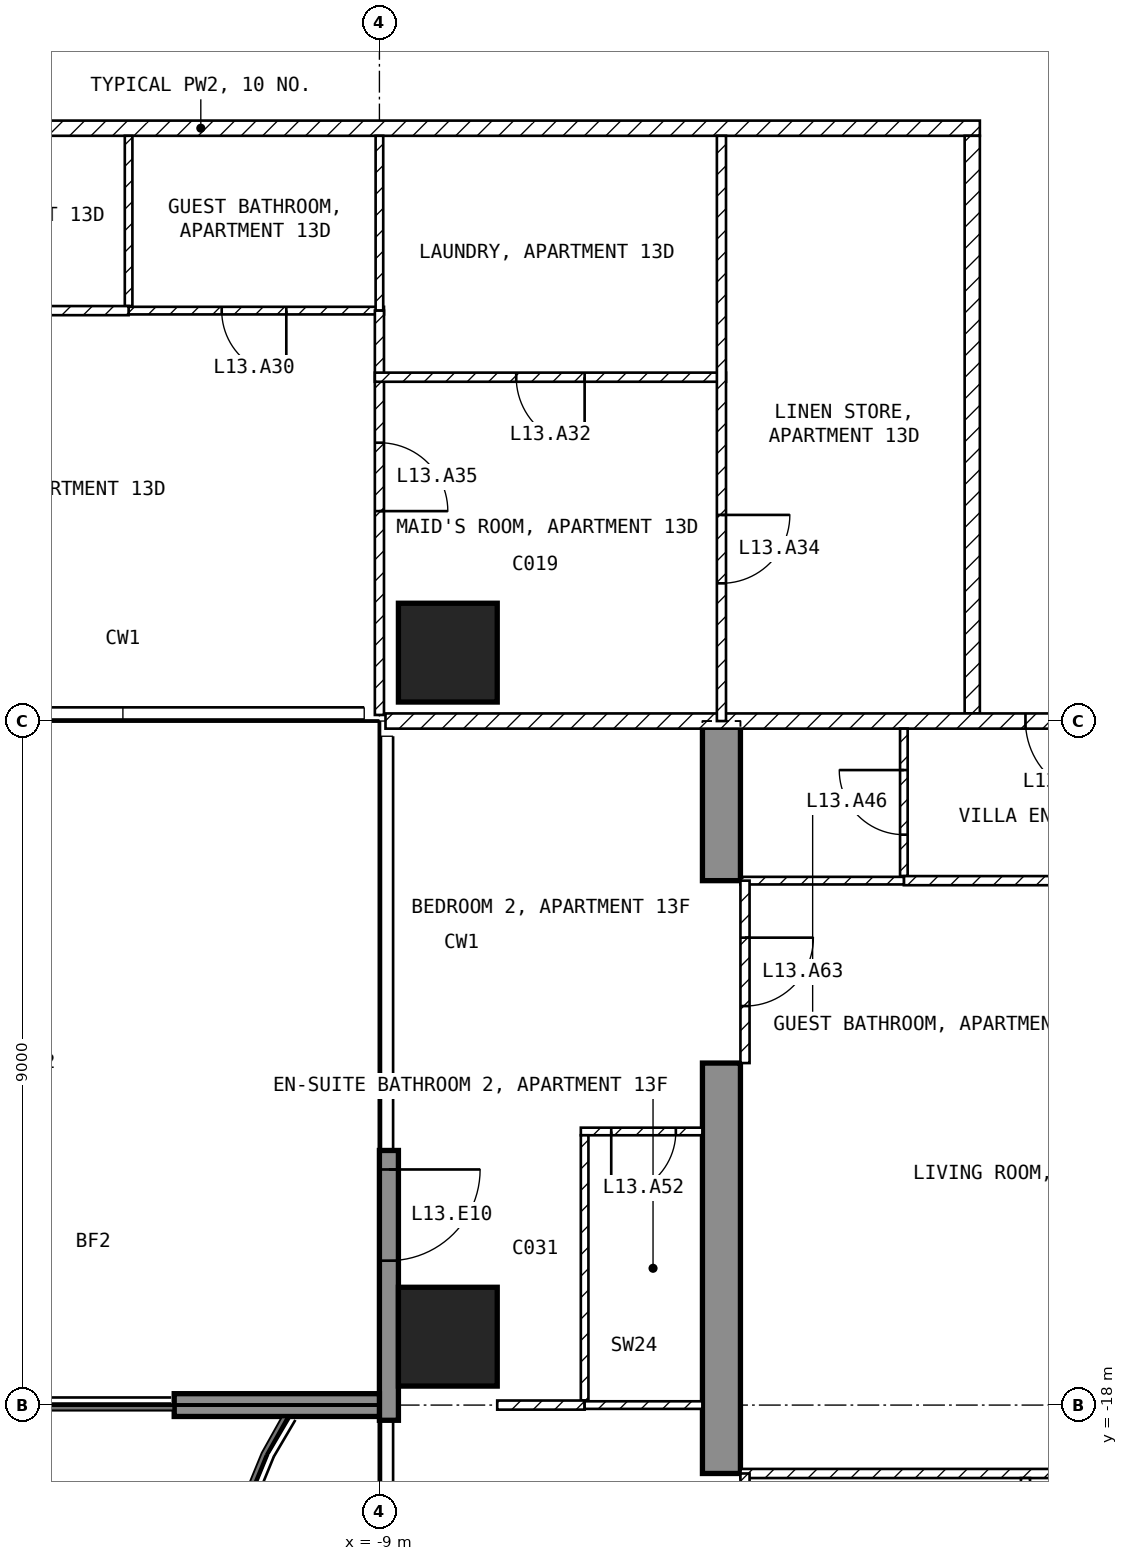
"""IFC4 building model, lengths in metres.
Left out: names, types, materials, properties, quantities, classifications, styles, units other than length and angle.
Written with IfcOpenShell. Run it as: python <this file> out.ifc"""

import sys

from ifc_helpers import new_model, si_unit, direction, frame, frame_2d, origin, origin_2d, place, context, subcontext, project, spatial, polyline, rectangle, outline, extrude, element, fill, save


model = new_model("IFC4")
c1 = context("Model", 3, precision=1e-05, world=origin(), true_north=direction((0.0, 1.0)))
c2 = subcontext(c1, "Body", "Model", "MODEL_VIEW")
j1 = project(units=[si_unit("LENGTHUNIT", "METRE"), si_unit("PLANEANGLEUNIT", "RADIAN")], contexts=[c1])
p1 = place(None, origin())
s1 = spatial("IfcSite", under=j1, at=p1, CompositionType="ELEMENT")
p2 = place(p1, origin())
s2 = spatial("IfcBuilding", under=s1, at=p2, CompositionType="ELEMENT")
p3 = place(p2, frame((0.0, 0.0, 64.5)))
s3 = spatial("IfcBuildingStorey", under=s2, at=p3, CompositionType="ELEMENT", Elevation=64.5)
for number, where, z_axis, x_axis in (
    (1, (-8.1, -17.1, -0.25), (0.0, 0.0, 1.0), (1.0, 0.0, 0.0)),
    (2, (-8.1, -8.1, -0.25), (0.0, 0.0, 1.0), (1.0, 0.0, 0.0)),
):
    element("IfcColumn", number, at=place(p3, frame(where, z_axis=z_axis, x_axis=x_axis)), inside=s3, PredefinedType="COLUMN", context=c2, shape_type="SweptSolid", body=[
        extrude(rectangle(XDim=1.3, YDim=1.3, at=origin_2d()), origin(), (0.0, 0.0, 1.0), 3.5),
    ])
p4 = place(p3, frame((-4.75, -25.45, -0.25), z_axis=(1.0, 0.0, 0.0), x_axis=(0.0, 1.0, 0.0)))
e3 = element("IfcWall", 3, at=p4, inside=s3, PredefinedType="SHEAR", context=c2, shape_type="SweptSolid", body=[
    extrude(outline(polyline([(0.0, 0.0), (4.15, 0.0), (4.15, 2.65), (6.55, 2.65), (6.55, 0.0), (11.95, 0.0), (11.95, 2.65), (14.35, 2.65), (14.35, 0.0), (16.45, 0.0), (16.45, 3.5), (0.0, 3.5), (0.0, 0.0)])), origin(), (0.0, 0.0, 1.0), 0.5),
])
p5 = place(p3, frame((-8.875, -14.65, 0.0), z_axis=(0.0, 0.0, 1.0), x_axis=(0.0, -1.0, 0.0)))
e4 = element("IfcWall", 4, at=p5, inside=s3, PredefinedType="SOLIDWALL", context=c2, shape_type="SweptSolid", body=[
    extrude(rectangle(XDim=3.55, YDim=0.25, at=frame_2d((1.775, 0.0))), origin(), (0.0, 0.0, 1.0), 3.25),
])
p6 = place(p5, frame((0.25, 0.0, 0.0)))
e5 = element("IfcOpeningElement", 5, at=p6, cuts=e4, PredefinedType="OPENING", context=c2, shape_type="SweptSolid", body=[
    extrude(rectangle(XDim=1.2, YDim=2.4, at=frame_2d((0.6, 1.2))), frame((0.0, 0.135, 0.0), z_axis=(0.0, -1.0, 0.0), x_axis=(1.0, 0.0, 0.0)), (0.0, 0.0, 1.0), 0.27),
])
p7 = place(p3, frame((-9.0, -18.0, 0.0), z_axis=(0.0, 0.0, 1.0), x_axis=(-1.0, 0.0, 0.0)))
e6 = element("IfcWall", 6, at=p7, inside=s3, PredefinedType="SOLIDWALL", context=c2, shape_type="SweptSolid", body=[
    extrude(rectangle(XDim=2.7, YDim=0.3, at=frame_2d((1.35, 0.0))), origin(), (0.0, 0.0, 1.0), 3.25),
])
p8 = place(p3, frame((-1.1, -1.2, 0.0), z_axis=(0.0, 0.0, 1.0), x_axis=(-1.0, 0.0, 0.0)))
e7 = element("IfcWall", 7, at=p8, inside=s3, PredefinedType="PARTITIONING", context=c2, shape_type="SweptSolid", body=[
    extrude(rectangle(XDim=20.5, YDim=0.2, at=frame_2d((10.25, 0.0))), origin(), (0.0, 0.0, 1.0), 3.25),
])
p9 = place(p8, frame((16.025, 0.0, 0.0)))
e8 = element("IfcOpeningElement", 8, at=p9, cuts=e7, PredefinedType="OPENING", context=c2, shape_type="SweptSolid", body=[
    extrude(rectangle(XDim=1.0, YDim=2.1, at=frame_2d((0.5, 1.05))), frame((0.0, 0.11, 0.0), z_axis=(0.0, -1.0, 0.0), x_axis=(1.0, 0.0, 0.0)), (0.0, 0.0, 1.0), 0.22),
])
p10 = place(p3, frame((-1.2, -8.9, 0.0), z_axis=(0.0, 0.0, 1.0), x_axis=(0.0, 1.0, 0.0)))
e9 = element("IfcWall", 9, at=p10, inside=s3, PredefinedType="PARTITIONING", context=c2, shape_type="SweptSolid", body=[
    extrude(rectangle(XDim=7.6, YDim=0.2, at=frame_2d((3.8, 0.0))), origin(), (0.0, 0.0, 1.0), 3.25),
])
p11 = place(p3, frame((8.92, -9.0, 0.0), z_axis=(0.0, 0.0, 1.0), x_axis=(-1.0, 0.0, 0.0)))
e10 = element("IfcWall", 10, at=p11, inside=s3, PredefinedType="PARTITIONING", context=c2, shape_type="SweptSolid", body=[
    extrude(rectangle(XDim=17.84, YDim=0.2, at=frame_2d((8.92, 0.0))), origin(), (0.0, 0.0, 1.0), 3.25),
])
p12 = place(p11, frame((8.42, 0.0, 0.0)))
e11 = element("IfcOpeningElement", 11, at=p12, cuts=e10, PredefinedType="OPENING", context=c2, shape_type="SweptSolid", body=[
    extrude(rectangle(XDim=1.0, YDim=2.1, at=frame_2d((0.5, 1.05))), frame((0.0, 0.11, 0.0), z_axis=(0.0, -1.0, 0.0), x_axis=(1.0, 0.0, 0.0)), (0.0, 0.0, 1.0), 0.22),
])
p13 = place(p3, frame((-12.3, -3.54, 0.0), z_axis=(0.0, 0.0, 1.0), x_axis=(0.0, 1.0, 0.0)))
e12 = element("IfcWall", 12, at=p13, inside=s3, PredefinedType="PARTITIONING", context=c2, shape_type="SweptSolid", body=[
    extrude(rectangle(XDim=2.24, YDim=0.1, at=frame_2d((1.12, 0.0))), origin(), (0.0, 0.0, 1.0), 3.25),
])
p14 = place(p3, frame((-8.94, -3.6, 0.0), z_axis=(0.0, 0.0, 1.0), x_axis=(-1.0, 0.0, 0.0)))
e13 = element("IfcWall", 13, at=p14, inside=s3, PredefinedType="PARTITIONING", context=c2, shape_type="SweptSolid", body=[
    extrude(rectangle(XDim=3.36, YDim=0.1, at=frame_2d((1.68, 0.0))), origin(), (0.0, 0.0, 1.0), 3.25),
])
p15 = place(p14, frame((1.285, 0.0, 0.0)))
e14 = element("IfcOpeningElement", 14, at=p15, cuts=e13, PredefinedType="OPENING", context=c2, shape_type="SweptSolid", body=[
    extrude(rectangle(XDim=0.85, YDim=2.1, at=frame_2d((0.425, 1.05))), frame((0.0, 0.06, 0.0), z_axis=(0.0, -1.0, 0.0), x_axis=(1.0, 0.0, 0.0)), (0.0, 0.0, 1.0), 0.12),
])
p16 = place(p3, frame((-9.0, -1.3, 0.0), z_axis=(0.0, 0.0, 1.0), x_axis=(0.0, -1.0, 0.0)))
e15 = element("IfcWall", 15, at=p16, inside=s3, PredefinedType="PARTITIONING", context=c2, shape_type="SweptSolid", body=[
    extrude(rectangle(XDim=2.3, YDim=0.1, at=frame_2d((1.15, 0.0))), origin(), (0.0, 0.0, 1.0), 3.25),
])
p17 = place(p3, frame((-12.3, -3.6, 0.0), z_axis=(0.0, 0.0, 1.0), x_axis=(-1.0, 0.0, 0.0)))
e16 = element("IfcWall", 16, at=p17, inside=s3, PredefinedType="PARTITIONING", context=c2, shape_type="SweptSolid", body=[
    extrude(rectangle(XDim=5.7, YDim=0.12, at=frame_2d((2.85, 0.0))), origin(), (0.0, 0.0, 1.0), 3.25),
])
p18 = place(p17, frame((4.35, 0.0, 0.0)))
e17 = element("IfcOpeningElement", 17, at=p18, cuts=e16, PredefinedType="OPENING", context=c2, shape_type="SweptSolid", body=[
    extrude(rectangle(XDim=0.9, YDim=2.1, at=frame_2d((0.45, 1.05))), frame((0.0, 0.07, 0.0), z_axis=(0.0, -1.0, 0.0), x_axis=(1.0, 0.0, 0.0)), (0.0, 0.0, 1.0), 0.14),
])
p19 = place(p3, frame((-9.0, -3.6, 0.0), z_axis=(0.0, 0.0, 1.0), x_axis=(0.0, -1.0, 0.0)))
e18 = element("IfcWall", 18, at=p19, inside=s3, PredefinedType="PARTITIONING", context=c2, shape_type="SweptSolid", body=[
    extrude(rectangle(XDim=5.32, YDim=0.12, at=frame_2d((2.66, 0.0))), origin(), (0.0, 0.0, 1.0), 3.25),
])
p20 = place(p19, frame((1.738, 0.0, 0.0)))
e19 = element("IfcOpeningElement", 19, at=p20, cuts=e18, PredefinedType="OPENING", context=c2, shape_type="SweptSolid", body=[
    extrude(rectangle(XDim=0.9, YDim=2.1, at=frame_2d((0.45, 1.05))), frame((0.0, 0.07, 0.0), z_axis=(0.0, -1.0, 0.0), x_axis=(1.0, 0.0, 0.0)), (0.0, 0.0, 1.0), 0.14),
])
p21 = place(p3, frame((-4.44, -4.476, 0.0), z_axis=(0.0, 0.0, 1.0), x_axis=(-1.0, 0.0, 0.0)))
e20 = element("IfcWall", 20, at=p21, inside=s3, PredefinedType="PARTITIONING", context=c2, shape_type="SweptSolid", body=[
    extrude(rectangle(XDim=4.62, YDim=0.12, at=frame_2d((2.31, 0.0))), origin(), (0.0, 0.0, 1.0), 3.25),
])
p22 = place(p21, frame((1.86, 0.0, 0.0)))
e21 = element("IfcOpeningElement", 21, at=p22, cuts=e20, PredefinedType="OPENING", context=c2, shape_type="SweptSolid", body=[
    extrude(rectangle(XDim=0.9, YDim=2.1, at=frame_2d((0.45, 1.05))), frame((0.0, 0.07, 0.0), z_axis=(0.0, -1.0, 0.0), x_axis=(1.0, 0.0, 0.0)), (0.0, 0.0, 1.0), 0.14),
])
p23 = place(p3, frame((-4.5, -1.3, 0.0), z_axis=(0.0, 0.0, 1.0), x_axis=(0.0, -1.0, 0.0)))
e22 = element("IfcWall", 22, at=p23, inside=s3, PredefinedType="PARTITIONING", context=c2, shape_type="SweptSolid", body=[
    extrude(rectangle(XDim=7.7, YDim=0.12, at=frame_2d((3.85, 0.0))), origin(), (0.0, 0.0, 1.0), 3.25),
])
p24 = place(p23, frame((4.988, 0.0, 0.0)))
e23 = element("IfcOpeningElement", 23, at=p24, cuts=e22, PredefinedType="OPENING", context=c2, shape_type="SweptSolid", body=[
    extrude(rectangle(XDim=0.9, YDim=2.1, at=frame_2d((0.45, 1.05))), frame((0.0, 0.07, 0.0), z_axis=(0.0, -1.0, 0.0), x_axis=(1.0, 0.0, 0.0)), (0.0, 0.0, 1.0), 0.14),
])
p25 = place(p3, frame((-2.1, -11.04, 0.0), z_axis=(0.0, 0.0, 1.0), x_axis=(0.0, 1.0, 0.0)))
e24 = element("IfcWall", 24, at=p25, inside=s3, PredefinedType="PARTITIONING", context=c2, shape_type="SweptSolid", body=[
    extrude(rectangle(XDim=1.94, YDim=0.1, at=frame_2d((0.97, 0.0))), origin(), (0.0, 0.0, 1.0), 3.25),
])
p26 = place(p25, frame((0.545, 0.0, 0.0)))
e25 = element("IfcOpeningElement", 25, at=p26, cuts=e24, PredefinedType="OPENING", context=c2, shape_type="SweptSolid", body=[
    extrude(rectangle(XDim=0.85, YDim=2.1, at=frame_2d((0.425, 1.05))), frame((0.0, 0.06, 0.0), z_axis=(0.0, -1.0, 0.0), x_axis=(1.0, 0.0, 0.0)), (0.0, 0.0, 1.0), 0.12),
])
p27 = place(p3, frame((4.25, -11.1, 0.0), z_axis=(0.0, 0.0, 1.0), x_axis=(-1.0, 0.0, 0.0)))
e26 = element("IfcWall", 26, at=p27, inside=s3, PredefinedType="PARTITIONING", context=c2, shape_type="SweptSolid", body=[
    extrude(rectangle(XDim=6.35, YDim=0.12, at=frame_2d((3.175, 0.0))), origin(), (0.0, 0.0, 1.0), 3.25),
])
p28 = place(p27, frame((2.725, 0.0, 0.0)))
e27 = element("IfcOpeningElement", 27, at=p28, cuts=e26, PredefinedType="OPENING", context=c2, shape_type="SweptSolid", body=[
    extrude(rectangle(XDim=0.9, YDim=2.1, at=frame_2d((0.45, 1.05))), frame((0.0, 0.07, 0.0), z_axis=(0.0, -1.0, 0.0), x_axis=(1.0, 0.0, 0.0)), (0.0, 0.0, 1.0), 0.14),
])
p29 = place(p3, frame((-2.1, -11.1, 0.0), z_axis=(0.0, 0.0, 1.0), x_axis=(-1.0, 0.0, 0.0)))
e28 = element("IfcWall", 28, at=p29, inside=s3, PredefinedType="PARTITIONING", context=c2, shape_type="SweptSolid", body=[
    extrude(rectangle(XDim=2.15, YDim=0.1, at=frame_2d((1.075, 0.0))), origin(), (0.0, 0.0, 1.0), 3.25),
])
p30 = place(p3, frame((4.25, -18.9, 0.0), z_axis=(0.0, 0.0, 1.0), x_axis=(-1.0, 0.0, 0.0)))
e29 = element("IfcWall", 29, at=p30, inside=s3, PredefinedType="PARTITIONING", context=c2, shape_type="SweptSolid", body=[
    extrude(rectangle(XDim=8.5, YDim=0.12, at=frame_2d((4.25, 0.0))), origin(), (0.0, 0.0, 1.0), 3.25),
])
p31 = place(p30, frame((1.925, 0.0, 0.0)))
e30 = element("IfcOpeningElement", 30, at=p31, cuts=e29, PredefinedType="OPENING", context=c2, shape_type="SweptSolid", body=[
    extrude(rectangle(XDim=0.9, YDim=2.1, at=frame_2d((0.45, 1.05))), frame((0.0, 0.07, 0.0), z_axis=(0.0, -1.0, 0.0), x_axis=(1.0, 0.0, 0.0)), (0.0, 0.0, 1.0), 0.14),
])
p32 = place(p3, frame((-0.5, -23.34, 0.0), z_axis=(0.0, 0.0, 1.0), x_axis=(0.0, 1.0, 0.0)))
e31 = element("IfcWall", 31, at=p32, inside=s3, PredefinedType="PARTITIONING", context=c2, shape_type="SweptSolid", body=[
    extrude(rectangle(XDim=4.38, YDim=0.12, at=frame_2d((2.19, 0.0))), origin(), (0.0, 0.0, 1.0), 3.25),
])
p33 = place(p32, frame((1.74, 0.0, 0.0)))
e32 = element("IfcOpeningElement", 32, at=p33, cuts=e31, PredefinedType="OPENING", context=c2, shape_type="SweptSolid", body=[
    extrude(rectangle(XDim=0.9, YDim=2.1, at=frame_2d((0.45, 1.05))), frame((0.0, 0.07, 0.0), z_axis=(0.0, -1.0, 0.0), x_axis=(1.0, 0.0, 0.0)), (0.0, 0.0, 1.0), 0.14),
])
p34 = place(p3, frame((-4.75, -14.4, 0.0), z_axis=(0.0, 0.0, 1.0), x_axis=(-1.0, 0.0, 0.0)))
e33 = element("IfcWall", 33, at=p34, inside=s3, PredefinedType="PARTITIONING", context=c2, shape_type="SweptSolid", body=[
    extrude(rectangle(XDim=1.6, YDim=0.1, at=frame_2d((0.8, 0.0))), origin(), (0.0, 0.0, 1.0), 3.25),
])
p35 = place(p34, frame((0.35, 0.0, 0.0)))
e34 = element("IfcOpeningElement", 34, at=p35, cuts=e33, PredefinedType="OPENING", context=c2, shape_type="SweptSolid", body=[
    extrude(rectangle(XDim=0.85, YDim=2.1, at=frame_2d((0.425, 1.05))), frame((0.0, 0.06, 0.0), z_axis=(0.0, -1.0, 0.0), x_axis=(1.0, 0.0, 0.0)), (0.0, 0.0, 1.0), 0.12),
])
p36 = place(p3, frame((-6.3, -14.45, 0.0), z_axis=(0.0, 0.0, 1.0), x_axis=(0.0, -1.0, 0.0)))
e35 = element("IfcWall", 35, at=p36, inside=s3, PredefinedType="PARTITIONING", context=c2, shape_type="SweptSolid", body=[
    extrude(rectangle(XDim=3.49, YDim=0.1, at=frame_2d((1.745, 0.0))), origin(), (0.0, 0.0, 1.0), 3.25),
])
p37 = place(p3, frame((-6.3, -18.0, 0.0), z_axis=(0.0, 0.0, 1.0), x_axis=(-1.0, 0.0, 0.0)))
e36 = element("IfcWall", 36, at=p37, inside=s3, PredefinedType="PARTITIONING", context=c2, shape_type="SweptSolid", body=[
    extrude(rectangle(XDim=1.15, YDim=0.12, at=frame_2d((0.575, 0.0))), origin(), (0.0, 0.0, 1.0), 3.25),
])
p38 = place(p3, frame((-4.75, -18.0, 0.0), z_axis=(0.0, 0.0, 1.0), x_axis=(-1.0, 0.0, 0.0)))
e37 = element("IfcWall", 37, at=p38, inside=s3, PredefinedType="PARTITIONING", context=c2, shape_type="SweptSolid", body=[
    extrude(rectangle(XDim=1.55, YDim=0.1, at=frame_2d((0.775, 0.0))), origin(), (0.0, 0.0, 1.0), 3.25),
])
p39 = place(p3, frame((-4.19, -11.1, 0.0), z_axis=(0.0, 0.0, 1.0), x_axis=(0.0, -1.0, 0.0)))
e38 = element("IfcWall", 38, at=p39, inside=s3, PredefinedType="PARTITIONING", context=c2, shape_type="SweptSolid", body=[
    extrude(rectangle(XDim=2.4, YDim=0.12, at=frame_2d((1.2, 0.0))), origin(), (0.0, 0.0, 1.0), 2.4),
])
p40 = place(p39, frame((0.75, 0.0, 0.0)))
e39 = element("IfcOpeningElement", 39, at=p40, cuts=e38, PredefinedType="OPENING", context=c2, shape_type="SweptSolid", body=[
    extrude(rectangle(XDim=0.9, YDim=2.1, at=frame_2d((0.45, 1.05))), frame((0.0, 0.07, 0.0), z_axis=(0.0, -1.0, 0.0), x_axis=(1.0, 0.0, 0.0)), (0.0, 0.0, 1.0), 0.14),
])
p41 = place(p3, frame((-4.19, -18.9, 0.0), z_axis=(0.0, 0.0, 1.0), x_axis=(0.0, -1.0, 0.0)))
e40 = element("IfcWall", 40, at=p41, inside=s3, PredefinedType="PARTITIONING", context=c2, shape_type="SweptSolid", body=[
    extrude(rectangle(XDim=2.4, YDim=0.12, at=frame_2d((1.2, 0.0))), origin(), (0.0, 0.0, 1.0), 2.4),
])
p42 = place(p41, frame((0.75, 0.0, 0.0)))
e41 = element("IfcOpeningElement", 41, at=p42, cuts=e40, PredefinedType="OPENING", context=c2, shape_type="SweptSolid", body=[
    extrude(rectangle(XDim=0.9, YDim=2.1, at=frame_2d((0.45, 1.05))), frame((0.0, 0.07, 0.0), z_axis=(0.0, -1.0, 0.0), x_axis=(1.0, 0.0, 0.0)), (0.0, 0.0, 1.0), 0.14),
])
p43 = place(p6, origin())
e42 = element("IfcDoor", 42, at=p43, inside=s3, OperationType="SINGLE_SWING_LEFT", PredefinedType="DOOR", context=c2, shape_type="SweptSolid", body=[
    extrude(rectangle(XDim=1.2, YDim=2.4, at=frame_2d((0.6, 1.2))), frame((0.0, 0.025, 0.0), z_axis=(0.0, -1.0, 0.0), x_axis=(1.0, 0.0, 0.0)), (0.0, 0.0, 1.0), 0.05),
])
fill(e5, e42)
p44 = place(p15, origin())
e43 = element("IfcDoor", 43, at=p44, inside=s3, OperationType="SINGLE_SWING_LEFT", PredefinedType="DOOR", context=c2, shape_type="SweptSolid", body=[
    extrude(rectangle(XDim=0.85, YDim=2.1, at=frame_2d((0.425, 1.05))), frame((0.0, 0.025, 0.0), z_axis=(0.0, -1.0, 0.0), x_axis=(1.0, 0.0, 0.0)), (0.0, 0.0, 1.0), 0.05),
])
fill(e14, e43)
p45 = place(p22, origin())
e44 = element("IfcDoor", 44, at=p45, inside=s3, OperationType="SINGLE_SWING_LEFT", PredefinedType="DOOR", context=c2, shape_type="SweptSolid", body=[
    extrude(rectangle(XDim=0.9, YDim=2.1, at=frame_2d((0.45, 1.05))), frame((0.0, 0.025, 0.0), z_axis=(0.0, -1.0, 0.0), x_axis=(1.0, 0.0, 0.0)), (0.0, 0.0, 1.0), 0.05),
])
fill(e21, e44)
p46 = place(p24, origin())
e45 = element("IfcDoor", 45, at=p46, inside=s3, OperationType="SINGLE_SWING_LEFT", PredefinedType="DOOR", context=c2, shape_type="SweptSolid", body=[
    extrude(rectangle(XDim=0.9, YDim=2.1, at=frame_2d((0.45, 1.05))), frame((0.0, 0.025, 0.0), z_axis=(0.0, -1.0, 0.0), x_axis=(1.0, 0.0, 0.0)), (0.0, 0.0, 1.0), 0.05),
])
fill(e23, e45)
p47 = place(p20, origin())
e46 = element("IfcDoor", 46, at=p47, inside=s3, OperationType="SINGLE_SWING_RIGHT", PredefinedType="DOOR", context=c2, shape_type="SweptSolid", body=[
    extrude(rectangle(XDim=0.9, YDim=2.1, at=frame_2d((0.45, 1.05))), frame((0.0, 0.025, 0.0), z_axis=(0.0, -1.0, 0.0), x_axis=(1.0, 0.0, 0.0)), (0.0, 0.0, 1.0), 0.05),
])
fill(e19, e46)
p48 = place(p12, origin())
e47 = element("IfcDoor", 47, at=p48, inside=s3, OperationType="SINGLE_SWING_LEFT", PredefinedType="DOOR", context=c2, shape_type="SweptSolid", body=[
    extrude(rectangle(XDim=1.0, YDim=2.1, at=frame_2d((0.5, 1.05))), frame((0.0, 0.025, 0.0), z_axis=(0.0, -1.0, 0.0), x_axis=(1.0, 0.0, 0.0)), (0.0, 0.0, 1.0), 0.05),
])
fill(e11, e47)
p49 = place(p26, origin())
e48 = element("IfcDoor", 48, at=p49, inside=s3, OperationType="SINGLE_SWING_RIGHT", PredefinedType="DOOR", context=c2, shape_type="SweptSolid", body=[
    extrude(rectangle(XDim=0.85, YDim=2.1, at=frame_2d((0.425, 1.05))), frame((0.0, 0.025, 0.0), z_axis=(0.0, -1.0, 0.0), x_axis=(1.0, 0.0, 0.0)), (0.0, 0.0, 1.0), 0.05),
])
fill(e25, e48)
p50 = place(p35, origin())
e49 = element("IfcDoor", 49, at=p50, inside=s3, OperationType="SINGLE_SWING_RIGHT", PredefinedType="DOOR", context=c2, shape_type="SweptSolid", body=[
    extrude(rectangle(XDim=0.85, YDim=2.1, at=frame_2d((0.425, 1.05))), frame((0.0, 0.025, 0.0), z_axis=(0.0, -1.0, 0.0), x_axis=(1.0, 0.0, 0.0)), (0.0, 0.0, 1.0), 0.05),
])
fill(e34, e49)
p51 = place(p40, origin())
e50 = element("IfcDoor", 50, at=p51, inside=s3, OperationType="SINGLE_SWING_LEFT", PredefinedType="DOOR", context=c2, shape_type="SweptSolid", body=[
    extrude(rectangle(XDim=0.9, YDim=2.1, at=frame_2d((0.45, 1.05))), frame((0.0, 0.025, 0.0), z_axis=(0.0, -1.0, 0.0), x_axis=(1.0, 0.0, 0.0)), (0.0, 0.0, 1.0), 0.05),
])
fill(e39, e50)
save(model, sys.argv[1])
